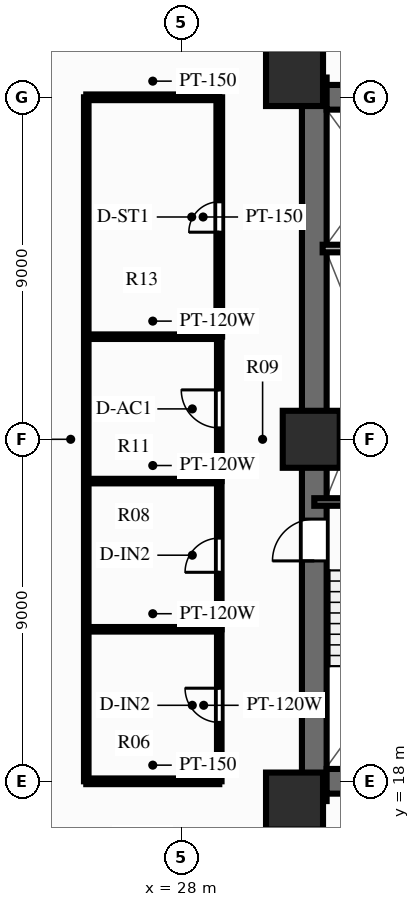
"""IFC4 building model, lengths in metres.
Left out: names, types, materials, properties, quantities, classifications, styles, units other than length and angle.
Written with IfcOpenShell. Run it as: python <this file> out.ifc"""

import sys

from ifc_helpers import new_model, si_unit, direction, frame, frame_2d, origin, origin_2d, place, context, subcontext, project, spatial, rectangle, extrude, source, transform, mapped, element, fill, save


model = new_model("IFC4")
c1 = context("Model", 3, precision=1e-05, world=origin(), true_north=direction((0.0, 1.0)))
c2 = subcontext(c1, "Body", "Model", "MODEL_VIEW")
j1 = project(units=[si_unit("LENGTHUNIT", "METRE"), si_unit("PLANEANGLEUNIT", "RADIAN")], contexts=[c1])
p1 = place(None, origin())
s1 = spatial("IfcSite", under=j1, at=p1, CompositionType="ELEMENT")
p2 = place(p1, origin())
s2 = spatial("IfcBuilding", under=s1, at=p2, CompositionType="ELEMENT")
p3 = place(p2, frame((0.0, 0.0, 4.2)))
s3 = spatial("IfcBuildingStorey", under=s2, at=p3, CompositionType="ELEMENT", Elevation=4.2)
p4 = place(p3, frame((31.5, 17.48, 0.0), z_axis=(0.0, 0.0, 1.0), x_axis=(0.0, 1.0, 0.0)))
e1 = element("IfcWall", 1, at=p4, inside=s3, PredefinedType="SHEAR", context=c2, shape_type="SweptSolid", body=[
    extrude(rectangle(XDim=19.04, YDim=0.65, at=frame_2d((9.52, 0.0))), origin(), (0.0, 0.0, 1.0), 3.6),
])
p5 = place(p4, frame((6.32, 0.0, 0.0)))
e2 = element("IfcOpeningElement", 2, at=p5, cuts=e1, PredefinedType="OPENING", context=c2, shape_type="SweptSolid", body=[
    extrude(rectangle(XDim=1.1, YDim=2.15, at=frame_2d((0.55, 1.075))), frame((0.0, 0.337, 0.0), z_axis=(0.0, -1.0, 0.0), x_axis=(1.0, 0.0, 0.0)), (0.0, 0.0, 1.0), 0.674),
])
p6 = place(p3, frame((31.825, 18.0, 0.0), z_axis=(0.0, 0.0, 1.0), x_axis=(1.0, 0.0, 0.0)))
e3 = element("IfcWall", 3, at=p6, inside=s3, PredefinedType="SHEAR", context=c2, shape_type="SweptSolid", body=[
    extrude(rectangle(XDim=12.35, YDim=0.65, at=frame_2d((6.175, 0.0))), origin(), (0.0, 0.0, 1.0), 3.6),
])
p7 = place(p3, frame((31.825, 36.0, 0.0), z_axis=(0.0, 0.0, 1.0), x_axis=(1.0, 0.0, 0.0)))
e4 = element("IfcWall", 4, at=p7, inside=s3, PredefinedType="SHEAR", context=c2, shape_type="SweptSolid", body=[
    extrude(rectangle(XDim=12.35, YDim=0.65, at=frame_2d((6.175, 0.0))), origin(), (0.0, 0.0, 1.0), 3.6),
])
p8 = place(p7, frame((5.125, 0.0, 0.0), z_axis=(0.0, 0.0, 1.0), x_axis=(-1.0, 0.0, 0.0)))
e5 = element("IfcOpeningElement", 5, at=p8, cuts=e4, PredefinedType="OPENING", context=c2, shape_type="SweptSolid", body=[
    extrude(rectangle(XDim=1.4, YDim=2.15, at=frame_2d((0.7, 1.075))), frame((0.0, 0.337, 0.0), z_axis=(0.0, -1.0, 0.0), x_axis=(1.0, 0.0, 0.0)), (0.0, 0.0, 1.0), 0.674),
])
m1 = source(origin(), c2, "Body", "SweptSolid", [
    extrude(rectangle(XDim=1.5, YDim=1.5, at=origin_2d()), origin(), (0.0, 0.0, 1.0), 3.6),
])
for number, where, z_axis, x_axis in (
    (6, (30.98, 17.48, 0.0), (0.0, 0.0, 1.0), (1.0, 0.0, 0.0)),
    (7, (30.98, 36.52, 0.0), (0.0, 0.0, 1.0), (1.0, 0.0, 0.0)),
    (8, (31.42, 27.0, 0.0), (0.0, 0.0, 1.0), (1.0, 0.0, 0.0)),
):
    element("IfcColumn", number, at=place(p3, frame(where, z_axis=z_axis, x_axis=x_axis)), inside=s3, PredefinedType="COLUMN", context=c2, shape_type="MappedRepresentation", body=[
        mapped(m1, transform((0.0, 0.0, 0.0), scale=1.0)),
    ])
p9 = place(p3, frame((31.5, 25.35, 0.0), z_axis=(0.0, 0.0, 1.0), x_axis=(1.0, 0.0, 0.0)))
e9 = element("IfcWall", 9, at=p9, inside=s3, PredefinedType="SOLIDWALL", context=c2, shape_type="SweptSolid", body=[
    extrude(rectangle(XDim=3.93, YDim=0.2, at=frame_2d((1.965, 0.0))), origin(), (0.0, 0.0, 1.0), 3.32),
])
p10 = place(p3, frame((31.72, 32.02, 0.0), z_axis=(0.0, 0.0, 1.0), x_axis=(1.0, 0.0, 0.0)))
e10 = element("IfcWall", 10, at=p10, inside=s3, PredefinedType="PARTITIONING", context=c2, shape_type="SweptSolid", body=[
    extrude(rectangle(XDim=2.8, YDim=0.2, at=frame_2d((1.4, 0.0))), origin(), (0.0, 0.0, 1.0), 3.32),
])
p11 = place(p3, frame((25.5, 18.0, 0.0), z_axis=(0.0, 0.0, 1.0), x_axis=(0.0, 1.0, 0.0)))
e11 = element("IfcWall", 11, at=p11, inside=s3, PredefinedType="PARTITIONING", context=c2, shape_type="SweptSolid", body=[
    extrude(rectangle(XDim=18.0, YDim=0.12, at=frame_2d((9.0, 0.0))), origin(), (0.0, 0.0, 1.0), 3.32),
])
p12 = place(p3, frame((29.0, 18.0, 0.0), z_axis=(0.0, 0.0, 1.0), x_axis=(0.0, 1.0, 0.0)))
e12 = element("IfcWall", 12, at=p12, inside=s3, PredefinedType="PARTITIONING", context=c2, shape_type="SweptSolid", body=[
    extrude(rectangle(XDim=4.0, YDim=0.12, at=frame_2d((2.0, 0.0))), origin(), (0.0, 0.0, 1.0), 3.32),
])
p13 = place(p12, frame((1.55, 0.0, 0.0)))
e13 = element("IfcOpeningElement", 13, at=p13, cuts=e12, PredefinedType="OPENING", context=c2, shape_type="SweptSolid", body=[
    extrude(rectangle(XDim=0.9, YDim=2.1, at=frame_2d((0.45, 1.05))), frame((0.0, 0.072, 0.0), z_axis=(0.0, -1.0, 0.0), x_axis=(1.0, 0.0, 0.0)), (0.0, 0.0, 1.0), 0.144),
])
p14 = place(p3, frame((29.0, 22.0, 0.0), z_axis=(0.0, 0.0, 1.0), x_axis=(0.0, 1.0, 0.0)))
e14 = element("IfcWall", 14, at=p14, inside=s3, PredefinedType="PARTITIONING", context=c2, shape_type="SweptSolid", body=[
    extrude(rectangle(XDim=3.9, YDim=0.12, at=frame_2d((1.95, 0.0))), origin(), (0.0, 0.0, 1.0), 3.32),
])
p15 = place(p14, frame((1.5, 0.0, 0.0)))
e15 = element("IfcOpeningElement", 15, at=p15, cuts=e14, PredefinedType="OPENING", context=c2, shape_type="SweptSolid", body=[
    extrude(rectangle(XDim=0.9, YDim=2.1, at=frame_2d((0.45, 1.05))), frame((0.0, 0.072, 0.0), z_axis=(0.0, -1.0, 0.0), x_axis=(1.0, 0.0, 0.0)), (0.0, 0.0, 1.0), 0.144),
])
p16 = place(p3, frame((29.0, 25.9, 0.0), z_axis=(0.0, 0.0, 1.0), x_axis=(0.0, 1.0, 0.0)))
e16 = element("IfcWall", 16, at=p16, inside=s3, PredefinedType="PARTITIONING", context=c2, shape_type="SweptSolid", body=[
    extrude(rectangle(XDim=3.8, YDim=0.12, at=frame_2d((1.9, 0.0))), origin(), (0.0, 0.0, 1.0), 3.32),
])
p17 = place(p16, frame((1.4, 0.0, 0.0)))
e17 = element("IfcOpeningElement", 17, at=p17, cuts=e16, PredefinedType="OPENING", context=c2, shape_type="SweptSolid", body=[
    extrude(rectangle(XDim=1.0, YDim=2.1, at=frame_2d((0.5, 1.05))), frame((0.0, 0.072, 0.0), z_axis=(0.0, -1.0, 0.0), x_axis=(1.0, 0.0, 0.0)), (0.0, 0.0, 1.0), 0.144),
])
p18 = place(p3, frame((29.0, 29.7, 0.0), z_axis=(0.0, 0.0, 1.0), x_axis=(0.0, 1.0, 0.0)))
e18 = element("IfcWall", 18, at=p18, inside=s3, PredefinedType="PARTITIONING", context=c2, shape_type="SweptSolid", body=[
    extrude(rectangle(XDim=6.3, YDim=0.15, at=frame_2d((3.15, 0.0))), origin(), (0.0, 0.0, 1.0), 3.32),
])
p19 = place(p18, frame((2.75, 0.0, 0.0)))
e19 = element("IfcOpeningElement", 19, at=p19, cuts=e18, PredefinedType="OPENING", context=c2, shape_type="SweptSolid", body=[
    extrude(rectangle(XDim=0.8, YDim=2.05, at=frame_2d((0.4, 1.025))), frame((0.0, 0.087, 0.0), z_axis=(0.0, -1.0, 0.0), x_axis=(1.0, 0.0, 0.0)), (0.0, 0.0, 1.0), 0.174),
])
for number, where, z_axis, x_axis in (
    (20, (25.5, 22.0, 0.0), (0.0, 0.0, 1.0), (1.0, 0.0, 0.0)),
    (21, (25.5, 25.9, 0.0), (0.0, 0.0, 1.0), (1.0, 0.0, 0.0)),
    (22, (25.5, 29.7, 0.0), (0.0, 0.0, 1.0), (1.0, 0.0, 0.0)),
):
    element("IfcWall", number, at=place(p3, frame(where, z_axis=z_axis, x_axis=x_axis)), inside=s3, PredefinedType="PARTITIONING", context=c2, shape_type="SweptSolid", body=[
        extrude(rectangle(XDim=3.5, YDim=0.12, at=frame_2d((1.75, 0.0))), origin(), (0.0, 0.0, 1.0), 3.32),
    ])
for number, where, z_axis, x_axis in (
    (23, (25.5, 36.0, 0.0), (0.0, 0.0, 1.0), (1.0, 0.0, 0.0)),
    (24, (25.5, 18.0, 0.0), (0.0, 0.0, 1.0), (1.0, 0.0, 0.0)),
):
    element("IfcWall", number, at=place(p3, frame(where, z_axis=z_axis, x_axis=x_axis)), inside=s3, PredefinedType="PARTITIONING", context=c2, shape_type="SweptSolid", body=[
        extrude(rectangle(XDim=3.5, YDim=0.15, at=frame_2d((1.75, 0.0))), origin(), (0.0, 0.0, 1.0), 2.69),
    ])
m2 = source(origin(), c2, "Body", "SweptSolid", [
    extrude(rectangle(XDim=1.1, YDim=2.15, at=frame_2d((0.55, 1.075))), frame((0.0, 0.025, 0.0), z_axis=(0.0, -1.0, 0.0), x_axis=(1.0, 0.0, 0.0)), (0.0, 0.0, 1.0), 0.05),
])
p20 = place(p5, origin())
e25 = element("IfcDoor", 25, at=p20, inside=s3, OperationType="SINGLE_SWING_LEFT", PredefinedType="DOOR", context=c2, shape_type="MappedRepresentation", body=[
    mapped(m2, transform((0.0, 0.0, 0.0), scale=1.0)),
])
fill(e2, e25)
m3 = source(origin(), c2, "Body", "SweptSolid", [
    extrude(rectangle(XDim=0.9, YDim=2.1, at=frame_2d((0.45, 1.05))), frame((0.0, 0.025, 0.0), z_axis=(0.0, -1.0, 0.0), x_axis=(1.0, 0.0, 0.0)), (0.0, 0.0, 1.0), 0.05),
])
p21 = place(p13, origin())
e26 = element("IfcDoor", 26, at=p21, inside=s3, OperationType="SINGLE_SWING_RIGHT", PredefinedType="DOOR", context=c2, shape_type="MappedRepresentation", body=[
    mapped(m3, transform((0.0, 0.0, 0.0), scale=1.0)),
])
fill(e13, e26)
p22 = place(p15, origin())
e27 = element("IfcDoor", 27, at=p22, inside=s3, OperationType="SINGLE_SWING_LEFT", PredefinedType="DOOR", context=c2, shape_type="MappedRepresentation", body=[
    mapped(m3, transform((0.0, 0.0, 0.0), scale=1.0)),
])
fill(e15, e27)
m4 = source(origin(), c2, "Body", "SweptSolid", [
    extrude(rectangle(XDim=1.0, YDim=2.1, at=frame_2d((0.5, 1.05))), frame((0.0, 0.025, 0.0), z_axis=(0.0, -1.0, 0.0), x_axis=(1.0, 0.0, 0.0)), (0.0, 0.0, 1.0), 0.05),
])
p23 = place(p17, origin())
e28 = element("IfcDoor", 28, at=p23, inside=s3, OperationType="SINGLE_SWING_RIGHT", PredefinedType="DOOR", context=c2, shape_type="MappedRepresentation", body=[
    mapped(m4, transform((0.0, 0.0, 0.0), scale=1.0)),
])
fill(e17, e28)
m5 = source(origin(), c2, "Body", "SweptSolid", [
    extrude(rectangle(XDim=0.8, YDim=2.05, at=frame_2d((0.4, 1.025))), frame((0.0, 0.025, 0.0), z_axis=(0.0, -1.0, 0.0), x_axis=(1.0, 0.0, 0.0)), (0.0, 0.0, 1.0), 0.05),
])
p24 = place(p19, origin())
e29 = element("IfcDoor", 29, at=p24, inside=s3, OperationType="SINGLE_SWING_LEFT", PredefinedType="DOOR", context=c2, shape_type="MappedRepresentation", body=[
    mapped(m5, transform((0.0, 0.0, 0.0), scale=1.0)),
])
fill(e19, e29)
save(model, sys.argv[1])
